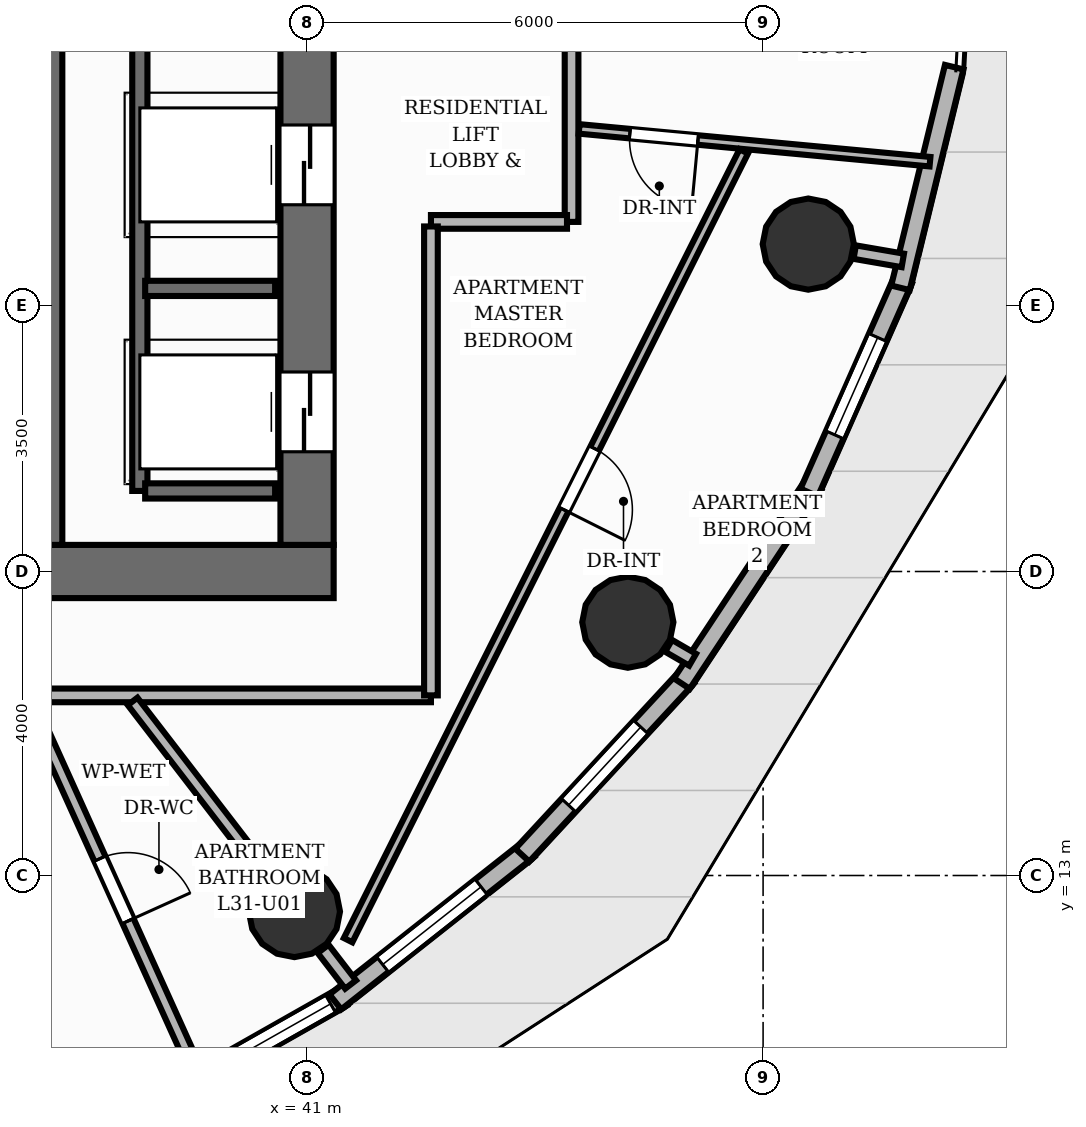
"""IFC4 building model, lengths in metres.
Left out: names, types, materials, properties, quantities, classifications, styles, units other than length and angle.
Written with IfcOpenShell. Run it as: python <this file> out.ifc"""

import sys

from ifc_helpers import new_model, si_unit, direction, frame, frame_2d, origin, origin_2d, place, context, subcontext, project, spatial, rectangle, circle, extrude, element, fill, save


model = new_model("IFC4")
c1 = context("Model", 3, precision=1e-05, world=origin(), true_north=direction((0.0, 1.0)))
c2 = subcontext(c1, "Body", "Model", "MODEL_VIEW")
j1 = project(units=[si_unit("LENGTHUNIT", "METRE"), si_unit("PLANEANGLEUNIT", "RADIAN")], contexts=[c1])
p1 = place(None, origin())
s1 = spatial("IfcSite", under=j1, at=p1, CompositionType="ELEMENT")
p2 = place(p1, origin())
s2 = spatial("IfcBuilding", under=s1, at=p2, CompositionType="ELEMENT")
p3 = place(p2, frame((0.0, 0.0, 106.08)))
s3 = spatial("IfcBuildingStorey", under=s2, at=p3, CompositionType="ELEMENT", Elevation=106.08)
p4 = place(p3, frame((22.65, 17.0, 0.0), z_axis=(0.0, 0.0, 1.0), x_axis=(1.0, 0.0, 0.0)))
e1 = element("IfcWall", 1, at=p4, inside=s3, PredefinedType="SHEAR", context=c2, shape_type="SweptSolid", body=[
    extrude(rectangle(XDim=18.7, YDim=0.7, at=frame_2d((9.35, 0.0))), origin(), (0.0, 0.0, 1.0), 3.2),
])
p5 = place(p4, frame((5.85, 0.0, 0.0)))
e2 = element("IfcOpeningElement", 2, at=p5, cuts=e1, PredefinedType="OPENING", context=c2, shape_type="SweptSolid", body=[
    extrude(rectangle(XDim=1.1, YDim=2.15, at=frame_2d((0.55, 1.075))), frame((0.0, 0.36, 0.0), z_axis=(0.0, -1.0, 0.0), x_axis=(1.0, 0.0, 0.0)), (0.0, 0.0, 1.0), 0.72),
])
p6 = place(p4, frame((9.4, 0.0, 0.0)))
e3 = element("IfcOpeningElement", 3, at=p6, cuts=e1, PredefinedType="OPENING", context=c2, shape_type="SweptSolid", body=[
    extrude(rectangle(XDim=0.9, YDim=2.1, at=frame_2d((0.45, 1.05))), frame((0.0, 0.36, 0.0), z_axis=(0.0, -1.0, 0.0), x_axis=(1.0, 0.0, 0.0)), (0.0, 0.0, 1.0), 0.72),
])
p7 = place(p3, frame((41.0, 17.35, 0.0), z_axis=(0.0, 0.0, 1.0), x_axis=(0.0, 1.0, 0.0)))
e4 = element("IfcWall", 4, at=p7, inside=s3, PredefinedType="SHEAR", context=c2, shape_type="SweptSolid", body=[
    extrude(rectangle(XDim=13.3, YDim=0.7, at=frame_2d((6.65, 0.0))), origin(), (0.0, 0.0, 1.0), 3.2),
])
p8 = place(p7, frame((1.225, 0.0, 0.0)))
e5 = element("IfcOpeningElement", 5, at=p8, cuts=e4, PredefinedType="OPENING", context=c2, shape_type="SweptSolid", body=[
    extrude(rectangle(XDim=1.05, YDim=2.15, at=frame_2d((0.525, 1.075))), frame((0.0, 0.36, 0.0), z_axis=(0.0, -1.0, 0.0), x_axis=(1.0, 0.0, 0.0)), (0.0, 0.0, 1.0), 0.72),
])
p9 = place(p7, frame((4.475, 0.0, 0.0)))
e6 = element("IfcOpeningElement", 6, at=p9, cuts=e4, PredefinedType="OPENING", context=c2, shape_type="SweptSolid", body=[
    extrude(rectangle(XDim=1.05, YDim=2.15, at=frame_2d((0.525, 1.075))), frame((0.0, 0.36, 0.0), z_axis=(0.0, -1.0, 0.0), x_axis=(1.0, 0.0, 0.0)), (0.0, 0.0, 1.0), 0.72),
])
p10 = place(p7, frame((7.775, 0.0, 0.0)))
e7 = element("IfcOpeningElement", 7, at=p10, cuts=e4, PredefinedType="OPENING", context=c2, shape_type="SweptSolid", body=[
    extrude(rectangle(XDim=1.05, YDim=2.15, at=frame_2d((0.525, 1.075))), frame((0.0, 0.36, 0.0), z_axis=(0.0, -1.0, 0.0), x_axis=(1.0, 0.0, 0.0)), (0.0, 0.0, 1.0), 0.72),
])
p11 = place(p7, frame((11.025, 0.0, 0.0)))
e8 = element("IfcOpeningElement", 8, at=p11, cuts=e4, PredefinedType="OPENING", context=c2, shape_type="SweptSolid", body=[
    extrude(rectangle(XDim=1.05, YDim=2.15, at=frame_2d((0.525, 1.075))), frame((0.0, 0.36, 0.0), z_axis=(0.0, -1.0, 0.0), x_axis=(1.0, 0.0, 0.0)), (0.0, 0.0, 1.0), 0.72),
])
p12 = place(p3, frame((37.5, 17.35, 0.0), z_axis=(0.0, 0.0, 1.0), x_axis=(0.0, 1.0, 0.0)))
e9 = element("IfcWall", 9, at=p12, inside=s3, PredefinedType="SHEAR", context=c2, shape_type="SweptSolid", body=[
    extrude(rectangle(XDim=13.3, YDim=0.56, at=frame_2d((6.65, 0.0))), origin(), (0.0, 0.0, 1.0), 3.2),
])
for number, where, z_axis, x_axis in (
    (10, (40.833, 12.526, 0.0), (0.0, 0.0, 1.0), (1.0, 0.0, 0.0)),
    (11, (45.22, 16.333, 0.0), (0.0, 0.0, 1.0), (1.0, 0.0, 0.0)),
    (12, (47.594, 21.308, 0.0), (0.0, 0.0, 1.0), (1.0, 0.0, 0.0)),
):
    element("IfcColumn", number, at=place(p3, frame(where, z_axis=z_axis, x_axis=x_axis)), inside=s3, PredefinedType="COLUMN", context=c2, shape_type="SweptSolid", body=[
        extrude(circle(Radius=0.6, at=origin_2d()), origin(), (0.0, 0.0, 1.0), 3.2),
    ])
p13 = place(p3, frame((41.462, 11.397, 0.0), z_axis=(0.0, 0.0, 1.0), x_axis=(-0.869984700924, -0.493078715986, 0.0)))
e13 = element("IfcWall", 13, at=p13, inside=s3, PredefinedType="SOLIDWALL", context=c2, shape_type="SweptSolid", body=[
    extrude(rectangle(XDim=3.26, YDim=0.25, at=frame_2d((1.63, 0.0))), origin(), (0.0, 0.0, 1.0), 2.96),
])
p14 = place(p13, frame((0.175, 0.0, 0.85)))
e14 = element("IfcOpeningElement", 14, at=p14, cuts=e13, PredefinedType="OPENING", context=c2, shape_type="SweptSolid", body=[
    extrude(rectangle(XDim=1.65, YDim=1.55, at=frame_2d((0.825, 0.775))), frame((0.0, 0.135, 0.0), z_axis=(0.0, -1.0, 0.0), x_axis=(1.0, 0.0, 0.0)), (0.0, 0.0, 1.0), 0.27),
])
p15 = place(p3, frame((43.912, 13.342, 0.0), z_axis=(0.0, 0.0, 1.0), x_axis=(-0.784871179145, -0.619658964389, 0.0)))
e15 = element("IfcWall", 15, at=p15, inside=s3, PredefinedType="SOLIDWALL", context=c2, shape_type="SweptSolid", body=[
    extrude(rectangle(XDim=3.236, YDim=0.25, at=frame_2d((1.618, 0.0))), origin(), (0.0, 0.0, 1.0), 2.96),
])
p16 = place(p15, frame((0.793, 0.0, 0.85)))
e16 = element("IfcOpeningElement", 16, at=p16, cuts=e15, PredefinedType="OPENING", context=c2, shape_type="SweptSolid", body=[
    extrude(rectangle(XDim=1.65, YDim=1.55, at=frame_2d((0.825, 0.775))), frame((0.0, 0.135, 0.0), z_axis=(0.0, -1.0, 0.0), x_axis=(1.0, 0.0, 0.0)), (0.0, 0.0, 1.0), 0.27),
])
p17 = place(p3, frame((45.999, 15.612, 0.0), z_axis=(0.0, 0.0, 1.0), x_axis=(-0.678956449941, -0.734178547142, 0.0)))
e17 = element("IfcWall", 17, at=p17, inside=s3, PredefinedType="SOLIDWALL", context=c2, shape_type="SweptSolid", body=[
    extrude(rectangle(XDim=3.192, YDim=0.25, at=frame_2d((1.596, 0.0))), origin(), (0.0, 0.0, 1.0), 2.96),
])
p18 = place(p17, frame((0.896, 0.0, 0.85)))
e18 = element("IfcOpeningElement", 18, at=p18, cuts=e17, PredefinedType="OPENING", context=c2, shape_type="SweptSolid", body=[
    extrude(rectangle(XDim=1.4, YDim=1.55, at=frame_2d((0.7, 0.775))), frame((0.0, 0.135, 0.0), z_axis=(0.0, -1.0, 0.0), x_axis=(1.0, 0.0, 0.0)), (0.0, 0.0, 1.0), 0.27),
])
p19 = place(p3, frame((47.659, 18.136, 0.0), z_axis=(0.0, 0.0, 1.0), x_axis=(-0.552034347266, -0.833821371421, 0.0)))
e19 = element("IfcWall", 19, at=p19, inside=s3, PredefinedType="SOLIDWALL", context=c2, shape_type="SweptSolid", body=[
    extrude(rectangle(XDim=3.131, YDim=0.25, at=frame_2d((1.565, 0.0))), origin(), (0.0, 0.0, 1.0), 2.96),
])
p20 = place(p3, frame((48.843, 20.838, 0.0), z_axis=(0.0, 0.0, 1.0), x_axis=(-0.404109525311, -0.914710605357, 0.0)))
e20 = element("IfcWall", 20, at=p20, inside=s3, PredefinedType="SOLIDWALL", context=c2, shape_type="SweptSolid", body=[
    extrude(rectangle(XDim=3.061, YDim=0.25, at=frame_2d((1.53, 0.0))), origin(), (0.0, 0.0, 1.0), 2.96),
])
p21 = place(p20, frame((0.83, 0.0, 0.85)))
e21 = element("IfcOpeningElement", 21, at=p21, cuts=e20, PredefinedType="OPENING", context=c2, shape_type="SweptSolid", body=[
    extrude(rectangle(XDim=1.4, YDim=1.55, at=frame_2d((0.7, 0.775))), frame((0.0, 0.135, 0.0), z_axis=(0.0, -1.0, 0.0), x_axis=(1.0, 0.0, 0.0)), (0.0, 0.0, 1.0), 0.27),
])
p22 = place(p3, frame((49.514, 23.636, 0.0), z_axis=(0.0, 0.0, 1.0), x_axis=(-0.236668427837, -0.971590477138, 0.0)))
e22 = element("IfcWall", 22, at=p22, inside=s3, PredefinedType="SOLIDWALL", context=c2, shape_type="SweptSolid", body=[
    extrude(rectangle(XDim=2.989, YDim=0.25, at=frame_2d((1.494, 0.0))), origin(), (0.0, 0.0, 1.0), 2.96),
])
p23 = place(p3, frame((38.8, 18.06, 0.0), z_axis=(0.0, 0.0, 1.0), x_axis=(0.0, 1.0, 0.0)))
e23 = element("IfcWall", 23, at=p23, inside=s3, PredefinedType="SHEAR", context=c2, shape_type="SweptSolid", body=[
    extrude(rectangle(XDim=11.88, YDim=0.2, at=frame_2d((5.94, 0.0))), origin(), (0.0, 0.0, 1.0), 3.2),
])
for number, where, z_axis, x_axis in (
    (24, (38.87, 18.06, 0.0), (0.0, 0.0, 1.0), (1.0, 0.0, 0.0)),
    (25, (38.87, 20.725, 0.0), (0.0, 0.0, 1.0), (1.0, 0.0, 0.0)),
):
    element("IfcWall", number, at=place(p3, frame(where, z_axis=z_axis, x_axis=x_axis)), inside=s3, PredefinedType="SHEAR", context=c2, shape_type="SweptSolid", body=[
        extrude(rectangle(XDim=1.71, YDim=0.2, at=frame_2d((0.855, 0.0))), origin(), (0.0, 0.0, 1.0), 3.2),
    ])
p24 = place(p3, frame((41.212, 12.034, 0.0), z_axis=(0.0, 0.0, 1.0), x_axis=(0.609790512648, -0.792562635181, 0.0)))
e26 = element("IfcWall", 26, at=p24, inside=s3, PredefinedType="PARTITIONING", context=c2, shape_type="SweptSolid", body=[
    extrude(rectangle(XDim=0.592, YDim=0.18, at=frame_2d((0.296, 0.0))), origin(), (0.0, 0.0, 1.0), 2.26),
])
p25 = place(p3, frame((45.757, 16.022, 0.0), z_axis=(0.0, 0.0, 1.0), x_axis=(0.864891917132, -0.501958137377, 0.0)))
e27 = element("IfcWall", 27, at=p25, inside=s3, PredefinedType="PARTITIONING", context=c2, shape_type="SweptSolid", body=[
    extrude(rectangle(XDim=0.365, YDim=0.18, at=frame_2d((0.183, 0.0))), origin(), (0.0, 0.0, 1.0), 2.26),
])
p26 = place(p3, frame((48.206, 21.202, 0.0), z_axis=(0.0, 0.0, 1.0), x_axis=(0.985389793052, -0.170314285219, 0.0)))
e28 = element("IfcWall", 28, at=p26, inside=s3, PredefinedType="PARTITIONING", context=c2, shape_type="SweptSolid", body=[
    extrude(rectangle(XDim=0.642, YDim=0.18, at=frame_2d((0.321, 0.0))), origin(), (0.0, 0.0, 1.0), 2.26),
])
p27 = place(p3, frame((42.63, 15.37, 0.0), z_axis=(0.0, 0.0, 1.0), x_axis=(-1.0, 0.0, 0.0)))
e29 = element("IfcWall", 29, at=p27, inside=s3, PredefinedType="PARTITIONING", context=c2, shape_type="SweptSolid", body=[
    extrude(rectangle(XDim=14.346, YDim=0.18, at=frame_2d((7.173, 0.0))), origin(), (0.0, 0.0, 1.0), 2.955),
])
p28 = place(p27, frame((6.615, 0.0, 0.0)))
e30 = element("IfcOpeningElement", 30, at=p28, cuts=e29, PredefinedType="OPENING", context=c2, shape_type="SweptSolid", body=[
    extrude(rectangle(XDim=1.05, YDim=2.15, at=frame_2d((0.525, 1.075))), frame((0.0, 0.1, 0.0), z_axis=(0.0, -1.0, 0.0), x_axis=(1.0, 0.0, 0.0)), (0.0, 0.0, 1.0), 0.2),
])
p29 = place(p3, frame((44.48, 26.34, 0.0), z_axis=(0.0, 0.0, 1.0), x_axis=(0.0, -1.0, 0.0)))
e31 = element("IfcWall", 31, at=p29, inside=s3, PredefinedType="PARTITIONING", context=c2, shape_type="SweptSolid", body=[
    extrude(rectangle(XDim=4.74, YDim=0.18, at=frame_2d((2.37, 0.0))), origin(), (0.0, 0.0, 1.0), 2.955),
])
p30 = place(p29, frame((1.239, 0.0, 0.0)))
e32 = element("IfcOpeningElement", 32, at=p30, cuts=e31, PredefinedType="OPENING", context=c2, shape_type="SweptSolid", body=[
    extrude(rectangle(XDim=1.05, YDim=2.15, at=frame_2d((0.525, 1.075))), frame((0.0, 0.1, 0.0), z_axis=(0.0, -1.0, 0.0), x_axis=(1.0, 0.0, 0.0)), (0.0, 0.0, 1.0), 0.2),
])
p31 = place(p3, frame((44.42, 21.6, 0.0), z_axis=(0.0, 0.0, 1.0), x_axis=(-1.0, 0.0, 0.0)))
e33 = element("IfcWall", 33, at=p31, inside=s3, PredefinedType="PARTITIONING", context=c2, shape_type="SweptSolid", body=[
    extrude(rectangle(XDim=1.79, YDim=0.18, at=frame_2d((0.895, 0.0))), origin(), (0.0, 0.0, 1.0), 2.26),
])
p32 = place(p3, frame((42.63, 21.54, 0.0), z_axis=(0.0, 0.0, 1.0), x_axis=(0.0, -1.0, 0.0)))
e34 = element("IfcWall", 34, at=p32, inside=s3, PredefinedType="PARTITIONING", context=c2, shape_type="SweptSolid", body=[
    extrude(rectangle(XDim=6.17, YDim=0.18, at=frame_2d((3.085, 0.0))), origin(), (0.0, 0.0, 1.0), 2.955),
])
p33 = place(p3, frame((37.345, 15.279, 0.0), z_axis=(0.0, 0.0, 1.0), x_axis=(0.411532357021, -0.911395149825, 0.0)))
e35 = element("IfcWall", 35, at=p33, inside=s3, PredefinedType="PLUMBINGWALL", context=c2, shape_type="SweptSolid", body=[
    extrude(rectangle(XDim=5.415, YDim=0.16, at=frame_2d((2.707, 0.0))), origin(), (0.0, 0.0, 1.0), 2.641),
])
p34 = place(p33, frame((2.257, 0.0, 0.0)))
e36 = element("IfcOpeningElement", 36, at=p34, cuts=e35, PredefinedType="OPENING", context=c2, shape_type="SweptSolid", body=[
    extrude(rectangle(XDim=0.9, YDim=2.1, at=frame_2d((0.45, 1.05))), frame((0.0, 0.09, 0.0), z_axis=(0.0, -1.0, 0.0), x_axis=(1.0, 0.0, 0.0)), (0.0, 0.0, 1.0), 0.18),
])
p35 = place(p3, frame((38.705, 15.291, 0.0), z_axis=(0.0, 0.0, 1.0), x_axis=(0.610033601295, -0.792375545617, 0.0)))
e37 = element("IfcWall", 37, at=p35, inside=s3, PredefinedType="PLUMBINGWALL", context=c2, shape_type="SweptSolid", body=[
    extrude(rectangle(XDim=2.887, YDim=0.16, at=frame_2d((1.443, 0.0))), origin(), (0.0, 0.0, 1.0), 2.26),
])
p36 = place(p3, frame((49.196, 22.392, 0.0), z_axis=(0.0, 0.0, 1.0), x_axis=(-0.99565683003, 0.09309928472, 0.0)))
e38 = element("IfcWall", 38, at=p36, inside=s3, PredefinedType="PARTITIONING", context=c2, shape_type="SweptSolid", body=[
    extrude(rectangle(XDim=4.636, YDim=0.125, at=frame_2d((2.318, 0.0))), origin(), (0.0, 0.0, 1.0), 2.955),
])
p37 = place(p36, frame((3.066, 0.0, 0.0)))
e39 = element("IfcOpeningElement", 39, at=p37, cuts=e38, PredefinedType="OPENING", context=c2, shape_type="SweptSolid", body=[
    extrude(rectangle(XDim=0.9, YDim=2.1, at=frame_2d((0.45, 1.05))), frame((0.0, 0.073, 0.0), z_axis=(0.0, -1.0, 0.0), x_axis=(1.0, 0.0, 0.0)), (0.0, 0.0, 1.0), 0.145),
])
p38 = place(p3, frame((46.746, 22.528, 0.0), z_axis=(0.0, 0.0, 1.0), x_axis=(-0.448357094434, -0.893854527242, 0.0)))
e40 = element("IfcWall", 40, at=p38, inside=s3, PredefinedType="PARTITIONING", context=c2, shape_type="SweptSolid", body=[
    extrude(rectangle(XDim=11.611, YDim=0.125, at=frame_2d((5.805, 0.0))), origin(), (0.0, 0.0, 1.0), 2.403),
])
p39 = place(p38, frame((4.375, 0.0, 0.0)))
e41 = element("IfcOpeningElement", 41, at=p39, cuts=e40, PredefinedType="OPENING", context=c2, shape_type="SweptSolid", body=[
    extrude(rectangle(XDim=0.9, YDim=2.1, at=frame_2d((0.45, 1.05))), frame((0.0, 0.073, 0.0), z_axis=(0.0, -1.0, 0.0), x_axis=(1.0, 0.0, 0.0)), (0.0, 0.0, 1.0), 0.145),
])
p40 = place(p14, origin())
e42 = element("IfcWindow", 42, at=p40, inside=s3, PartitioningType="SINGLE_PANEL", PredefinedType="WINDOW", context=c2, shape_type="SweptSolid", body=[
    extrude(rectangle(XDim=1.65, YDim=1.55, at=frame_2d((0.825, 0.775))), frame((0.0, 0.03, 0.0), z_axis=(0.0, -1.0, 0.0), x_axis=(1.0, 0.0, 0.0)), (0.0, 0.0, 1.0), 0.06),
])
fill(e14, e42)
p41 = place(p16, origin())
e43 = element("IfcWindow", 43, at=p41, inside=s3, PartitioningType="SINGLE_PANEL", PredefinedType="WINDOW", context=c2, shape_type="SweptSolid", body=[
    extrude(rectangle(XDim=1.65, YDim=1.55, at=frame_2d((0.825, 0.775))), frame((0.0, 0.03, 0.0), z_axis=(0.0, -1.0, 0.0), x_axis=(1.0, 0.0, 0.0)), (0.0, 0.0, 1.0), 0.06),
])
fill(e16, e43)
p42 = place(p18, origin())
e44 = element("IfcWindow", 44, at=p42, inside=s3, PartitioningType="SINGLE_PANEL", PredefinedType="WINDOW", context=c2, shape_type="SweptSolid", body=[
    extrude(rectangle(XDim=1.4, YDim=1.55, at=frame_2d((0.7, 0.775))), frame((0.0, 0.03, 0.0), z_axis=(0.0, -1.0, 0.0), x_axis=(1.0, 0.0, 0.0)), (0.0, 0.0, 1.0), 0.06),
])
fill(e18, e44)
p43 = place(p21, origin())
e45 = element("IfcWindow", 45, at=p43, inside=s3, PartitioningType="SINGLE_PANEL", PredefinedType="WINDOW", context=c2, shape_type="SweptSolid", body=[
    extrude(rectangle(XDim=1.4, YDim=1.55, at=frame_2d((0.7, 0.775))), frame((0.0, 0.03, 0.0), z_axis=(0.0, -1.0, 0.0), x_axis=(1.0, 0.0, 0.0)), (0.0, 0.0, 1.0), 0.06),
])
fill(e21, e45)
p44 = place(p8, origin())
e46 = element("IfcDoor", 46, at=p44, inside=s3, OperationType="DOUBLE_DOOR_SLIDING", PredefinedType="DOOR", context=c2, shape_type="SweptSolid", body=[
    extrude(rectangle(XDim=1.05, YDim=2.15, at=frame_2d((0.525, 1.075))), frame((0.0, 0.025, 0.0), z_axis=(0.0, -1.0, 0.0), x_axis=(1.0, 0.0, 0.0)), (0.0, 0.0, 1.0), 0.05),
])
fill(e5, e46)
p45 = place(p9, origin())
e47 = element("IfcDoor", 47, at=p45, inside=s3, OperationType="DOUBLE_DOOR_SLIDING", PredefinedType="DOOR", context=c2, shape_type="SweptSolid", body=[
    extrude(rectangle(XDim=1.05, YDim=2.15, at=frame_2d((0.525, 1.075))), frame((0.0, 0.025, 0.0), z_axis=(0.0, -1.0, 0.0), x_axis=(1.0, 0.0, 0.0)), (0.0, 0.0, 1.0), 0.05),
])
fill(e6, e47)
p46 = place(p34, origin())
e48 = element("IfcDoor", 48, at=p46, inside=s3, OperationType="SINGLE_SWING_RIGHT", PredefinedType="DOOR", context=c2, shape_type="SweptSolid", body=[
    extrude(rectangle(XDim=0.9, YDim=2.1, at=frame_2d((0.45, 1.05))), frame((0.0, 0.025, 0.0), z_axis=(0.0, -1.0, 0.0), x_axis=(1.0, 0.0, 0.0)), (0.0, 0.0, 1.0), 0.05),
])
fill(e36, e48)
p47 = place(p37, origin())
e49 = element("IfcDoor", 49, at=p47, inside=s3, OperationType="SINGLE_SWING_LEFT", PredefinedType="DOOR", context=c2, shape_type="SweptSolid", body=[
    extrude(rectangle(XDim=0.9, YDim=2.1, at=frame_2d((0.45, 1.05))), frame((0.0, 0.025, 0.0), z_axis=(0.0, -1.0, 0.0), x_axis=(1.0, 0.0, 0.0)), (0.0, 0.0, 1.0), 0.05),
])
fill(e39, e49)
p48 = place(p39, origin())
e50 = element("IfcDoor", 50, at=p48, inside=s3, OperationType="SINGLE_SWING_RIGHT", PredefinedType="DOOR", context=c2, shape_type="SweptSolid", body=[
    extrude(rectangle(XDim=0.9, YDim=2.1, at=frame_2d((0.45, 1.05))), frame((0.0, 0.025, 0.0), z_axis=(0.0, -1.0, 0.0), x_axis=(1.0, 0.0, 0.0)), (0.0, 0.0, 1.0), 0.05),
])
fill(e41, e50)
save(model, sys.argv[1])
